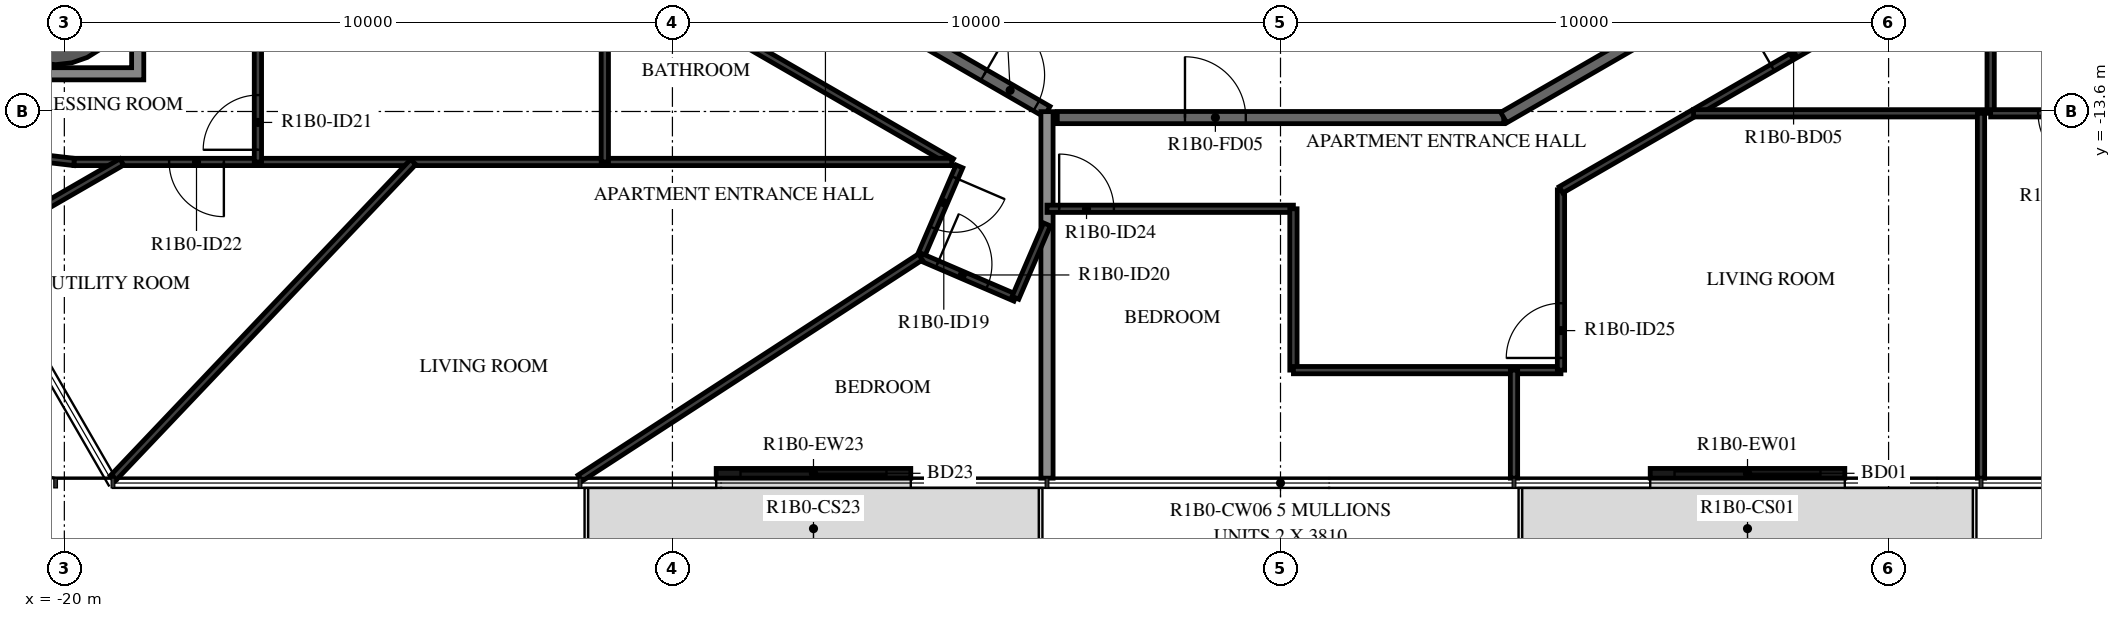
"""IFC4 building model, lengths in metres.
Left out: names, types, materials, properties, quantities, classifications, styles, units other than length and angle.
Written with IfcOpenShell. Run it as: python <this file> out.ifc"""

import sys

from ifc_helpers import new_model, si_unit, direction, frame, frame_2d, origin, origin_2d, place, context, subcontext, project, spatial, polyline, rectangle, hollow_circle, outline, extrude, element, fill, save


model = new_model("IFC4")
c1 = context("Model", 3, precision=1e-05, world=origin(), true_north=direction((0.0, 1.0)))
c2 = subcontext(c1, "Body", "Model", "MODEL_VIEW")
j1 = project(units=[si_unit("LENGTHUNIT", "METRE"), si_unit("PLANEANGLEUNIT", "RADIAN")], contexts=[c1])
p1 = place(None, origin())
s1 = spatial("IfcSite", under=j1, at=p1, CompositionType="ELEMENT")
p2 = place(p1, origin())
s2 = spatial("IfcBuilding", under=s1, at=p2, CompositionType="ELEMENT")
p3 = place(p2, frame((0.0, 0.0, 52.4)))
s3 = spatial("IfcBuildingStorey", under=s2, at=p3, CompositionType="ELEMENT", Elevation=52.4)
p4 = place(p3, frame((-20.144, -11.63, -0.38), z_axis=(0.0, 0.0, 1.0), x_axis=(1.0, 0.0, 0.0)))
e1 = element("IfcColumn", 1, at=p4, inside=s3, PredefinedType="COLUMN", context=c2, shape_type="SweptSolid", body=[
    extrude(hollow_circle(Radius=1.2, WallThickness=0.06, at=origin_2d()), origin(), (0.0, 0.0, 1.0), 3.5),
])
p5 = place(p3, frame((-9.28, -19.55, 0.0), z_axis=(0.0, 0.0, 1.0), x_axis=(1.0, 0.0, 0.0)))
e2 = element("IfcWall", 2, at=p5, inside=s3, PredefinedType="STANDARD", context=c2, shape_type="SweptSolid", body=[
    extrude(rectangle(XDim=3.2, YDim=0.16, at=frame_2d((1.6, 0.0))), origin(), (0.0, 0.0, 1.0), 3.12),
])
p6 = place(p5, frame((0.4, 0.0, 0.0)))
e3 = element("IfcOpeningElement", 3, at=p6, cuts=e2, PredefinedType="OPENING", context=c2, shape_type="SweptSolid", body=[
    extrude(rectangle(XDim=2.4, YDim=2.4, at=frame_2d((1.2, 1.2))), frame((0.0, 0.09, 0.0), z_axis=(0.0, -1.0, 0.0), x_axis=(1.0, 0.0, 0.0)), (0.0, 0.0, 1.0), 0.18),
])
p7 = place(p3, frame((6.08, -19.55, 0.0), z_axis=(0.0, 0.0, 1.0), x_axis=(1.0, 0.0, 0.0)))
e4 = element("IfcWall", 4, at=p7, inside=s3, PredefinedType="STANDARD", context=c2, shape_type="SweptSolid", body=[
    extrude(rectangle(XDim=3.2, YDim=0.16, at=frame_2d((1.6, 0.0))), origin(), (0.0, 0.0, 1.0), 3.12),
])
p8 = place(p7, frame((0.4, 0.0, 0.0)))
e5 = element("IfcOpeningElement", 5, at=p8, cuts=e4, PredefinedType="OPENING", context=c2, shape_type="SweptSolid", body=[
    extrude(rectangle(XDim=2.4, YDim=2.4, at=frame_2d((1.2, 1.2))), frame((0.0, 0.09, 0.0), z_axis=(0.0, -1.0, 0.0), x_axis=(1.0, 0.0, 0.0)), (0.0, 0.0, 1.0), 0.18),
])
p9 = place(p3, frame((-10.029, -10.029, 0.0), z_axis=(0.0, 0.0, 1.0), x_axis=(0.866022878987, -0.500004373052, 0.0)))
e6 = element("IfcWall", 6, at=p9, inside=s3, PredefinedType="STANDARD", context=c2, shape_type="SweptSolid", body=[
    extrude(rectangle(XDim=7.146, YDim=0.2, at=frame_2d((3.573, 0.0))), origin(), (0.0, 0.0, 1.0), 3.12),
])
p10 = place(p9, frame((5.947, 0.0, 0.0)))
e7 = element("IfcOpeningElement", 7, at=p10, cuts=e6, PredefinedType="OPENING", context=c2, shape_type="SweptSolid", body=[
    extrude(rectangle(XDim=1.0, YDim=2.1, at=frame_2d((0.5, 1.05))), frame((0.0, 0.11, 0.0), z_axis=(0.0, -1.0, 0.0), x_axis=(1.0, 0.0, 0.0)), (0.0, 0.0, 1.0), 0.22),
])
p11 = place(p3, frame((-3.671, -13.7, 0.0), z_axis=(0.0, 0.0, 1.0), x_axis=(1.0, 0.0, 0.0)))
e8 = element("IfcWall", 8, at=p11, inside=s3, PredefinedType="STANDARD", context=c2, shape_type="SweptSolid", body=[
    extrude(rectangle(XDim=7.342, YDim=0.2, at=frame_2d((3.671, 0.0))), origin(), (0.0, 0.0, 1.0), 3.12),
])
p12 = place(p11, frame((2.1, 0.0, 0.0)))
e9 = element("IfcOpeningElement", 9, at=p12, cuts=e8, PredefinedType="OPENING", context=c2, shape_type="SweptSolid", body=[
    extrude(rectangle(XDim=1.0, YDim=2.1, at=frame_2d((0.5, 1.05))), frame((0.0, 0.11, 0.0), z_axis=(0.0, -1.0, 0.0), x_axis=(1.0, 0.0, 0.0)), (0.0, 0.0, 1.0), 0.22),
])
p13 = place(p3, frame((3.671, -13.7, 0.0), z_axis=(0.0, 0.0, 1.0), x_axis=(0.866024439905, 0.500001669485, 0.0)))
e10 = element("IfcWall", 10, at=p13, inside=s3, PredefinedType="STANDARD", context=c2, shape_type="SweptSolid", body=[
    extrude(rectangle(XDim=7.342, YDim=0.2, at=frame_2d((3.671, 0.0))), origin(), (0.0, 0.0, 1.0), 3.12),
])
p14 = place(p3, frame((-3.84, -19.63, 0.0), z_axis=(0.0, 0.0, 1.0), x_axis=(0.0, 1.0, 0.0)))
e11 = element("IfcWall", 11, at=p14, inside=s3, PredefinedType="STANDARD", context=c2, shape_type="SweptSolid", body=[
    extrude(rectangle(XDim=6.028, YDim=0.2, at=frame_2d((3.014, 0.0))), origin(), (0.0, 0.0, 1.0), 2.73),
])
p15 = place(p3, frame((-5.28, -14.503, 0.0), z_axis=(0.0, 0.0, 1.0), x_axis=(-0.395209511122, -0.918591009274, 0.0)))
e12 = element("IfcWall", 12, at=p15, inside=s3, PredefinedType="PARTITIONING", context=c2, shape_type="SweptSolid", body=[
    extrude(rectangle(XDim=1.621, YDim=0.12, at=frame_2d((0.811, 0.0))), origin(), (0.0, 0.0, 1.0), 3.12),
])
p16 = place(p15, frame((0.2, 0.0, 0.0)))
e13 = element("IfcOpeningElement", 13, at=p16, cuts=e12, PredefinedType="OPENING", context=c2, shape_type="SweptSolid", body=[
    extrude(rectangle(XDim=0.9, YDim=2.1, at=frame_2d((0.45, 1.05))), frame((0.0, 0.07, 0.0), z_axis=(0.0, -1.0, 0.0), x_axis=(1.0, 0.0, 0.0)), (0.0, 0.0, 1.0), 0.14),
])
p17 = place(p3, frame((-11.112, -11.136, 0.0), z_axis=(0.0, 0.0, 1.0), x_axis=(0.866017718408, -0.500013311227, 0.0)))
e14 = element("IfcWall", 14, at=p17, inside=s3, PredefinedType="PARTITIONING", context=c2, shape_type="SweptSolid", body=[
    extrude(rectangle(XDim=6.588, YDim=0.12, at=frame_2d((3.294, 0.0))), origin(), (0.0, 0.0, 1.0), 3.12),
])
p18 = place(p17, frame((0.4, 0.0, 0.0)))
e15 = element("IfcOpeningElement", 15, at=p18, cuts=e14, PredefinedType="OPENING", context=c2, shape_type="SweptSolid", body=[
    extrude(rectangle(XDim=0.8, YDim=2.1, at=frame_2d((0.4, 1.05))), frame((0.0, 0.07, 0.0), z_axis=(0.0, -1.0, 0.0), x_axis=(1.0, 0.0, 0.0)), (0.0, 0.0, 1.0), 0.14),
])
p19 = place(p3, frame((-5.921, -15.992, 0.0), z_axis=(0.0, 0.0, 1.0), x_axis=(0.918557080237, -0.395288363536, 0.0)))
e16 = element("IfcWall", 16, at=p19, inside=s3, PredefinedType="PARTITIONING", context=c2, shape_type="SweptSolid", body=[
    extrude(rectangle(XDim=1.7, YDim=0.12, at=frame_2d((0.85, 0.0))), origin(), (0.0, 0.0, 1.0), 3.12),
])
p20 = place(p19, frame((0.3, 0.0, 0.0)))
e17 = element("IfcOpeningElement", 17, at=p20, cuts=e16, PredefinedType="OPENING", context=c2, shape_type="SweptSolid", body=[
    extrude(rectangle(XDim=0.9, YDim=2.1, at=frame_2d((0.45, 1.05))), frame((0.0, 0.07, 0.0), z_axis=(0.0, -1.0, 0.0), x_axis=(1.0, 0.0, 0.0)), (0.0, 0.0, 1.0), 0.14),
])
p21 = place(p3, frame((-4.36, -16.664, 0.0), z_axis=(0.0, 0.0, 1.0), x_axis=(0.395353859705, 0.918528892097, 0.0)))
e18 = element("IfcWall", 18, at=p21, inside=s3, PredefinedType="PARTITIONING", context=c2, shape_type="SweptSolid", body=[
    extrude(rectangle(XDim=1.314, YDim=0.12, at=frame_2d((0.657, 0.0))), origin(), (0.0, 0.0, 1.0), 3.12),
])
p22 = place(p3, frame((-5.407, -14.43, 0.0), z_axis=(0.0, 0.0, 1.0), x_axis=(-1.0, 0.0, 0.0)))
e19 = element("IfcWall", 19, at=p22, inside=s3, PredefinedType="PARTITIONING", context=c2, shape_type="SweptSolid", body=[
    extrude(rectangle(XDim=14.434, YDim=0.12, at=frame_2d((7.217, 0.0))), origin(), (0.0, 0.0, 1.0), 3.12),
])
p23 = place(p22, frame((11.97, 0.0, 0.0)))
e20 = element("IfcOpeningElement", 20, at=p23, cuts=e19, PredefinedType="OPENING", context=c2, shape_type="SweptSolid", body=[
    extrude(rectangle(XDim=0.9, YDim=2.1, at=frame_2d((0.45, 1.05))), frame((0.0, 0.07, 0.0), z_axis=(0.0, -1.0, 0.0), x_axis=(1.0, 0.0, 0.0)), (0.0, 0.0, 1.0), 0.14),
])
p24 = place(p3, frame((-19.841, -14.43, 0.0), z_axis=(0.0, 0.0, 1.0), x_axis=(-0.993245320107, 0.116033331788, 0.0)))
e21 = element("IfcWall", 21, at=p24, inside=s3, PredefinedType="PARTITIONING", context=c2, shape_type="SweptSolid", body=[
    extrude(rectangle(XDim=0.947, YDim=0.12, at=frame_2d((0.473, 0.0))), origin(), (0.0, 0.0, 1.0), 3.12),
])
p25 = place(p3, frame((-25.068, -17.901, 0.0), z_axis=(0.0, 0.0, 1.0), x_axis=(0.866025136247, 0.500000463387, 0.0)))
e22 = element("IfcWall", 22, at=p25, inside=s3, PredefinedType="PARTITIONING", context=c2, shape_type="SweptSolid", body=[
    extrude(rectangle(XDim=6.943, YDim=0.12, at=frame_2d((3.471, 0.0))), origin(), (0.0, 0.0, 1.0), 3.12),
])
p26 = place(p25, frame((0.4, 0.0, 0.0)))
e23 = element("IfcOpeningElement", 23, at=p26, cuts=e22, PredefinedType="OPENING", context=c2, shape_type="SweptSolid", body=[
    extrude(rectangle(XDim=0.9, YDim=2.1, at=frame_2d((0.45, 1.05))), frame((0.0, 0.07, 0.0), z_axis=(0.0, -1.0, 0.0), x_axis=(1.0, 0.0, 0.0)), (0.0, 0.0, 1.0), 0.14),
])
p27 = place(p3, frame((-16.817, -14.43, 0.0), z_axis=(0.0, 0.0, 1.0), x_axis=(0.0, 1.0, 0.0)))
e24 = element("IfcWall", 24, at=p27, inside=s3, PredefinedType="PARTITIONING", context=c2, shape_type="SweptSolid", body=[
    extrude(rectangle(XDim=4.721, YDim=0.12, at=frame_2d((2.36, 0.0))), origin(), (0.0, 0.0, 1.0), 3.12),
])
p28 = place(p27, frame((0.2, 0.0, 0.0)))
e25 = element("IfcOpeningElement", 25, at=p28, cuts=e24, PredefinedType="OPENING", context=c2, shape_type="SweptSolid", body=[
    extrude(rectangle(XDim=0.9, YDim=2.1, at=frame_2d((0.45, 1.05))), frame((0.0, 0.07, 0.0), z_axis=(0.0, -1.0, 0.0), x_axis=(1.0, 0.0, 0.0)), (0.0, 0.0, 1.0), 0.14),
])
p29 = place(p3, frame((-11.112, -14.43, 0.0), z_axis=(0.0, 0.0, 1.0), x_axis=(0.0, 1.0, 0.0)))
e26 = element("IfcWall", 26, at=p29, inside=s3, PredefinedType="PARTITIONING", context=c2, shape_type="SweptSolid", body=[
    extrude(rectangle(XDim=3.294, YDim=0.12, at=frame_2d((1.647, 0.0))), origin(), (0.0, 0.0, 1.0), 3.12),
])
p30 = place(p3, frame((-19.2, -19.63, 0.0), z_axis=(0.0, 0.0, 1.0), x_axis=(0.688551680792, 0.72518727435, 0.0)))
e27 = element("IfcWall", 27, at=p30, inside=s3, PredefinedType="PARTITIONING", context=c2, shape_type="SweptSolid", body=[
    extrude(rectangle(XDim=7.17, YDim=0.12, at=frame_2d((3.585, 0.0))), origin(), (0.0, 0.0, 1.0), 3.12),
])
p31 = place(p3, frame((-11.52, -19.63, 0.0), z_axis=(0.0, 0.0, 1.0), x_axis=(0.838545516556, 0.544831548888, 0.0)))
e28 = element("IfcWall", 28, at=p31, inside=s3, PredefinedType="PARTITIONING", context=c2, shape_type="SweptSolid", body=[
    extrude(rectangle(XDim=6.677, YDim=0.12, at=frame_2d((3.339, 0.0))), origin(), (0.0, 0.0, 1.0), 3.12),
])
p32 = place(p3, frame((-3.84, -15.2, 0.0), z_axis=(0.0, 0.0, 1.0), x_axis=(1.0, 0.0, 0.0)))
e29 = element("IfcWall", 29, at=p32, inside=s3, PredefinedType="PARTITIONING", context=c2, shape_type="SweptSolid", body=[
    extrude(rectangle(XDim=4.052, YDim=0.12, at=frame_2d((2.026, 0.0))), origin(), (0.0, 0.0, 1.0), 3.12),
])
p33 = place(p32, frame((0.2, 0.0, 0.0)))
e30 = element("IfcOpeningElement", 30, at=p33, cuts=e29, PredefinedType="OPENING", context=c2, shape_type="SweptSolid", body=[
    extrude(rectangle(XDim=0.9, YDim=2.1, at=frame_2d((0.45, 1.05))), frame((0.0, 0.07, 0.0), z_axis=(0.0, -1.0, 0.0), x_axis=(1.0, 0.0, 0.0)), (0.0, 0.0, 1.0), 0.14),
])
p34 = place(p3, frame((0.212, -15.2, 0.0), z_axis=(0.0, 0.0, 1.0), x_axis=(0.0, -1.0, 0.0)))
e31 = element("IfcWall", 31, at=p34, inside=s3, PredefinedType="PARTITIONING", context=c2, shape_type="SweptSolid", body=[
    extrude(rectangle(XDim=2.653, YDim=0.12, at=frame_2d((1.327, 0.0))), origin(), (0.0, 0.0, 1.0), 3.12),
])
p35 = place(p3, frame((0.212, -17.853, 0.0), z_axis=(0.0, 0.0, 1.0), x_axis=(1.0, 0.0, 0.0)))
e32 = element("IfcWall", 32, at=p35, inside=s3, PredefinedType="PARTITIONING", context=c2, shape_type="SweptSolid", body=[
    extrude(rectangle(XDim=4.4, YDim=0.12, at=frame_2d((2.2, 0.0))), origin(), (0.0, 0.0, 1.0), 3.12),
])
p36 = place(p3, frame((4.613, -17.853, 0.0), z_axis=(0.0, 0.0, 1.0), x_axis=(0.0, 1.0, 0.0)))
e33 = element("IfcWall", 33, at=p36, inside=s3, PredefinedType="PARTITIONING", context=c2, shape_type="SweptSolid", body=[
    extrude(rectangle(XDim=2.965, YDim=0.12, at=frame_2d((1.482, 0.0))), origin(), (0.0, 0.0, 1.0), 3.12),
])
p37 = place(p36, frame((0.2, 0.0, 0.0)))
e34 = element("IfcOpeningElement", 34, at=p37, cuts=e33, PredefinedType="OPENING", context=c2, shape_type="SweptSolid", body=[
    extrude(rectangle(XDim=0.9, YDim=2.1, at=frame_2d((0.45, 1.05))), frame((0.0, 0.07, 0.0), z_axis=(0.0, -1.0, 0.0), x_axis=(1.0, 0.0, 0.0)), (0.0, 0.0, 1.0), 0.14),
])
p38 = place(p3, frame((4.613, -14.888, 0.0), z_axis=(0.0, 0.0, 1.0), x_axis=(0.866025608725, 0.499999645032, 0.0)))
e35 = element("IfcWall", 35, at=p38, inside=s3, PredefinedType="PARTITIONING", context=c2, shape_type="SweptSolid", body=[
    extrude(rectangle(XDim=7.522, YDim=0.12, at=frame_2d((3.761, 0.0))), origin(), (0.0, 0.0, 1.0), 3.12),
])
p39 = place(p38, frame((4.017, 0.0, 0.0)))
e36 = element("IfcOpeningElement", 36, at=p39, cuts=e35, PredefinedType="OPENING", context=c2, shape_type="SweptSolid", body=[
    extrude(rectangle(XDim=0.8, YDim=2.1, at=frame_2d((0.4, 1.05))), frame((0.0, 0.07, 0.0), z_axis=(0.0, -1.0, 0.0), x_axis=(1.0, 0.0, 0.0)), (0.0, 0.0, 1.0), 0.14),
])
p40 = place(p3, frame((3.84, -19.63, 0.0), z_axis=(0.0, 0.0, 1.0), x_axis=(0.0, 1.0, 0.0)))
e37 = element("IfcWall", 37, at=p40, inside=s3, PredefinedType="PARTITIONING", context=c2, shape_type="SweptSolid", body=[
    extrude(rectangle(XDim=1.777, YDim=0.12, at=frame_2d((0.888, 0.0))), origin(), (0.0, 0.0, 1.0), 2.73),
])
p41 = place(p3, frame((11.56, -13.63, 0.0), z_axis=(0.0, 0.0, 1.0), x_axis=(-1.0, 0.0, 0.0)))
e38 = element("IfcWall", 38, at=p41, inside=s3, PredefinedType="PARTITIONING", context=c2, shape_type="SweptSolid", body=[
    extrude(rectangle(XDim=4.768, YDim=0.12, at=frame_2d((2.384, 0.0))), origin(), (0.0, 0.0, 1.0), 3.12),
])
p42 = place(p3, frame((11.52, -19.63, 0.0), z_axis=(0.0, 0.0, 1.0), x_axis=(0.0, 1.0, 0.0)))
e39 = element("IfcWall", 39, at=p42, inside=s3, PredefinedType="PARTITIONING", context=c2, shape_type="SweptSolid", body=[
    extrude(rectangle(XDim=6.0, YDim=0.12, at=frame_2d((3.0, 0.0))), origin(), (0.0, 0.0, 1.0), 2.73),
])
p43 = place(p3, frame((11.678, -13.63, 0.0), z_axis=(0.0, 0.0, 1.0), x_axis=(0.0, 1.0, 0.0)))
e40 = element("IfcWall", 40, at=p43, inside=s3, PredefinedType="PARTITIONING", context=c2, shape_type="SweptSolid", body=[
    extrude(rectangle(XDim=3.458, YDim=0.12, at=frame_2d((1.729, 0.0))), origin(), (0.0, 0.0, 1.0), 3.12),
])
p44 = place(p3, frame((19.794, -13.63, 0.0), z_axis=(0.0, 0.0, 1.0), x_axis=(-1.0, 0.0, 0.0)))
e41 = element("IfcWall", 41, at=p44, inside=s3, PredefinedType="PARTITIONING", context=c2, shape_type="SweptSolid", body=[
    extrude(rectangle(XDim=8.116, YDim=0.12, at=frame_2d((4.058, 0.0))), origin(), (0.0, 0.0, 1.0), 3.12),
])
p45 = place(p44, frame((6.436, 0.0, 0.0)))
e42 = element("IfcOpeningElement", 42, at=p45, cuts=e41, PredefinedType="OPENING", context=c2, shape_type="SweptSolid", body=[
    extrude(rectangle(XDim=0.9, YDim=2.1, at=frame_2d((0.45, 1.05))), frame((0.0, 0.07, 0.0), z_axis=(0.0, -1.0, 0.0), x_axis=(1.0, 0.0, 0.0)), (0.0, 0.0, 1.0), 0.14),
])
p46 = place(p44, frame((1.6, 0.0, 0.0)))
e43 = element("IfcOpeningElement", 43, at=p46, cuts=e41, PredefinedType="OPENING", context=c2, shape_type="SweptSolid", body=[
    extrude(rectangle(XDim=0.9, YDim=2.1, at=frame_2d((0.45, 1.05))), frame((0.0, 0.07, 0.0), z_axis=(0.0, -1.0, 0.0), x_axis=(1.0, 0.0, 0.0)), (0.0, 0.0, 1.0), 0.14),
])
p47 = place(p3, origin())
e44 = element("IfcWall", 44, at=p47, inside=s3, PredefinedType="STANDARD", context=c2, shape_type="SweptSolid", body=[
    extrude(outline(polyline([(-18.694, -10.18), (-18.694, -13.08), (-21.594, -13.08), (-21.594, -10.18), (-18.694, -10.18)]), holes=[polyline([(-21.394, -12.88), (-18.894, -12.88), (-18.894, -10.38), (-21.394, -10.38), (-21.394, -12.88)])]), origin(), (0.0, 0.0, 1.0), 3.12),
])
p48 = place(p6, origin())
e45 = element("IfcDoor", 45, at=p48, inside=s3, OperationType="DOUBLE_DOOR_SLIDING", PredefinedType="DOOR", context=c2, shape_type="SweptSolid", body=[
    extrude(rectangle(XDim=2.4, YDim=2.4, at=frame_2d((1.2, 1.2))), frame((0.0, 0.025, 0.0), z_axis=(0.0, -1.0, 0.0), x_axis=(1.0, 0.0, 0.0)), (0.0, 0.0, 1.0), 0.05),
])
fill(e3, e45)
p49 = place(p8, origin())
e46 = element("IfcDoor", 46, at=p49, inside=s3, OperationType="DOUBLE_DOOR_SLIDING", PredefinedType="DOOR", context=c2, shape_type="SweptSolid", body=[
    extrude(rectangle(XDim=2.4, YDim=2.4, at=frame_2d((1.2, 1.2))), frame((0.0, 0.025, 0.0), z_axis=(0.0, -1.0, 0.0), x_axis=(1.0, 0.0, 0.0)), (0.0, 0.0, 1.0), 0.05),
])
fill(e5, e46)
p50 = place(p10, origin())
e47 = element("IfcDoor", 47, at=p50, inside=s3, OperationType="SINGLE_SWING_LEFT", PredefinedType="DOOR", context=c2, shape_type="SweptSolid", body=[
    extrude(rectangle(XDim=1.0, YDim=2.1, at=frame_2d((0.5, 1.05))), frame((0.0, 0.025, 0.0), z_axis=(0.0, -1.0, 0.0), x_axis=(1.0, 0.0, 0.0)), (0.0, 0.0, 1.0), 0.05),
])
fill(e7, e47)
p51 = place(p16, origin())
e48 = element("IfcDoor", 48, at=p51, inside=s3, OperationType="SINGLE_SWING_RIGHT", PredefinedType="DOOR", context=c2, shape_type="SweptSolid", body=[
    extrude(rectangle(XDim=0.9, YDim=2.1, at=frame_2d((0.45, 1.05))), frame((0.0, 0.025, 0.0), z_axis=(0.0, -1.0, 0.0), x_axis=(1.0, 0.0, 0.0)), (0.0, 0.0, 1.0), 0.05),
])
fill(e13, e48)
p52 = place(p20, origin())
e49 = element("IfcDoor", 49, at=p52, inside=s3, OperationType="SINGLE_SWING_LEFT", PredefinedType="DOOR", context=c2, shape_type="SweptSolid", body=[
    extrude(rectangle(XDim=0.9, YDim=2.1, at=frame_2d((0.45, 1.05))), frame((0.0, 0.025, 0.0), z_axis=(0.0, -1.0, 0.0), x_axis=(1.0, 0.0, 0.0)), (0.0, 0.0, 1.0), 0.05),
])
fill(e17, e49)
p53 = place(p28, origin())
e50 = element("IfcDoor", 50, at=p53, inside=s3, OperationType="SINGLE_SWING_LEFT", PredefinedType="DOOR", context=c2, shape_type="SweptSolid", body=[
    extrude(rectangle(XDim=0.9, YDim=2.1, at=frame_2d((0.45, 1.05))), frame((0.0, 0.025, 0.0), z_axis=(0.0, -1.0, 0.0), x_axis=(1.0, 0.0, 0.0)), (0.0, 0.0, 1.0), 0.05),
])
fill(e25, e50)
p54 = place(p23, origin())
e51 = element("IfcDoor", 51, at=p54, inside=s3, OperationType="SINGLE_SWING_LEFT", PredefinedType="DOOR", context=c2, shape_type="SweptSolid", body=[
    extrude(rectangle(XDim=0.9, YDim=2.1, at=frame_2d((0.45, 1.05))), frame((0.0, 0.025, 0.0), z_axis=(0.0, -1.0, 0.0), x_axis=(1.0, 0.0, 0.0)), (0.0, 0.0, 1.0), 0.05),
])
fill(e20, e51)
p55 = place(p12, origin())
e52 = element("IfcDoor", 52, at=p55, inside=s3, OperationType="SINGLE_SWING_LEFT", PredefinedType="DOOR", context=c2, shape_type="SweptSolid", body=[
    extrude(rectangle(XDim=1.0, YDim=2.1, at=frame_2d((0.5, 1.05))), frame((0.0, 0.025, 0.0), z_axis=(0.0, -1.0, 0.0), x_axis=(1.0, 0.0, 0.0)), (0.0, 0.0, 1.0), 0.05),
])
fill(e9, e52)
p56 = place(p33, origin())
e53 = element("IfcDoor", 53, at=p56, inside=s3, OperationType="SINGLE_SWING_LEFT", PredefinedType="DOOR", context=c2, shape_type="SweptSolid", body=[
    extrude(rectangle(XDim=0.9, YDim=2.1, at=frame_2d((0.45, 1.05))), frame((0.0, 0.025, 0.0), z_axis=(0.0, -1.0, 0.0), x_axis=(1.0, 0.0, 0.0)), (0.0, 0.0, 1.0), 0.05),
])
fill(e30, e53)
p57 = place(p37, origin())
e54 = element("IfcDoor", 54, at=p57, inside=s3, OperationType="SINGLE_SWING_RIGHT", PredefinedType="DOOR", context=c2, shape_type="SweptSolid", body=[
    extrude(rectangle(XDim=0.9, YDim=2.1, at=frame_2d((0.45, 1.05))), frame((0.0, 0.025, 0.0), z_axis=(0.0, -1.0, 0.0), x_axis=(1.0, 0.0, 0.0)), (0.0, 0.0, 1.0), 0.05),
])
fill(e34, e54)
p58 = place(p39, origin())
e55 = element("IfcDoor", 55, at=p58, inside=s3, OperationType="SINGLE_SWING_RIGHT", PredefinedType="DOOR", context=c2, shape_type="SweptSolid", body=[
    extrude(rectangle(XDim=0.8, YDim=2.1, at=frame_2d((0.4, 1.05))), frame((0.0, 0.025, 0.0), z_axis=(0.0, -1.0, 0.0), x_axis=(1.0, 0.0, 0.0)), (0.0, 0.0, 1.0), 0.05),
])
fill(e36, e55)
p59 = place(p45, origin())
e56 = element("IfcDoor", 56, at=p59, inside=s3, OperationType="SINGLE_SWING_RIGHT", PredefinedType="DOOR", context=c2, shape_type="SweptSolid", body=[
    extrude(rectangle(XDim=0.9, YDim=2.1, at=frame_2d((0.45, 1.05))), frame((0.0, 0.025, 0.0), z_axis=(0.0, -1.0, 0.0), x_axis=(1.0, 0.0, 0.0)), (0.0, 0.0, 1.0), 0.05),
])
fill(e42, e56)
save(model, sys.argv[1])
